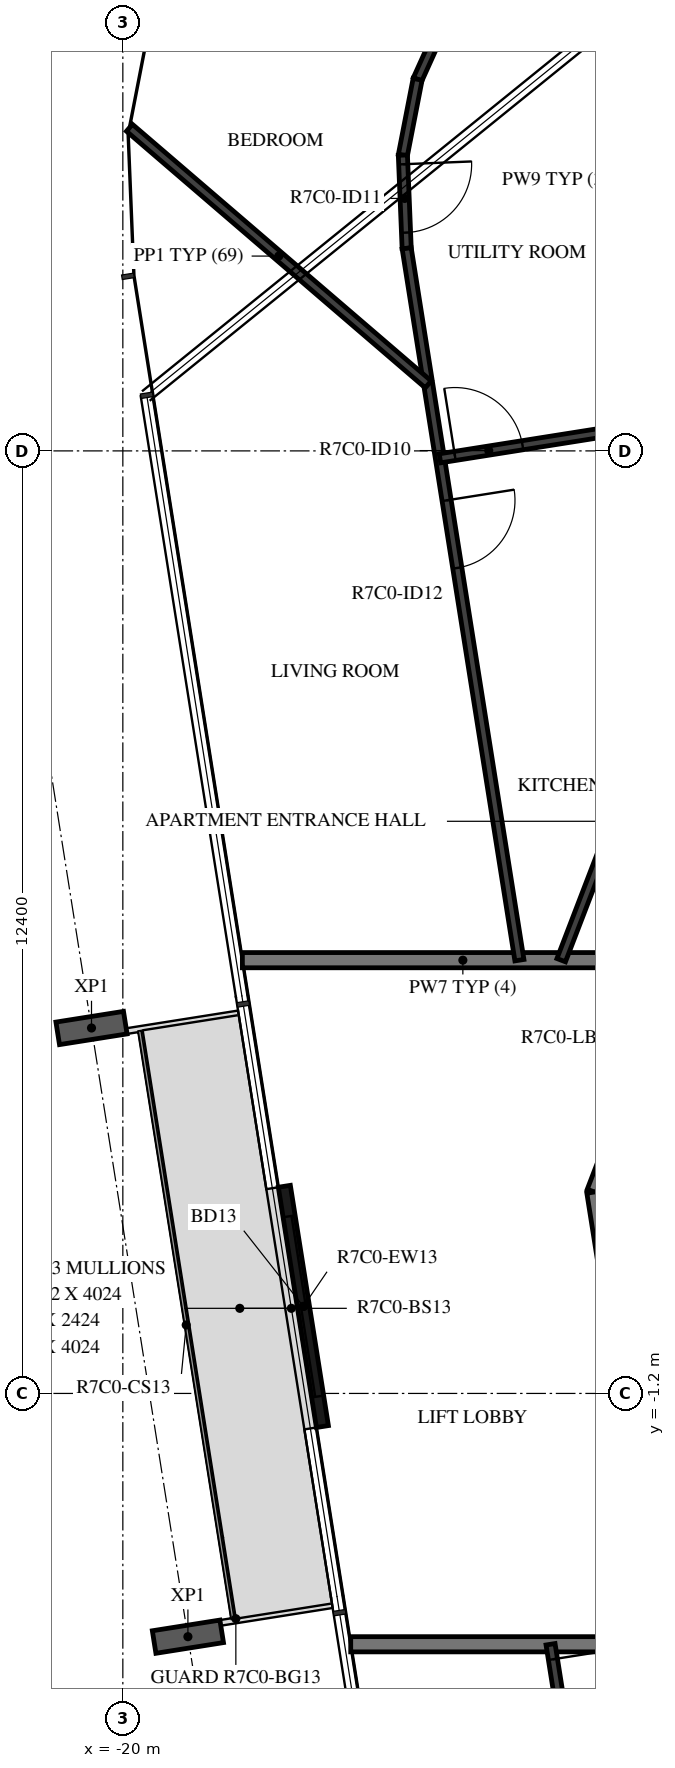
"""IFC4 building model, lengths in metres.
Left out: names, types, materials, properties, quantities, classifications, styles, units other than length and angle.
Written with IfcOpenShell. Run it as: python <this file> out.ifc"""

import sys

from ifc_helpers import new_model, si_unit, direction, frame, frame_2d, origin, origin_2d, place, context, subcontext, project, spatial, rectangle, i_section, extrude, element, fill, save


model = new_model("IFC4")
c1 = context("Model", 3, precision=1e-05, world=origin(), true_north=direction((0.0, 1.0)))
c2 = subcontext(c1, "Body", "Model", "MODEL_VIEW")
j1 = project(units=[si_unit("LENGTHUNIT", "METRE"), si_unit("PLANEANGLEUNIT", "RADIAN")], contexts=[c1])
p1 = place(None, origin())
s1 = spatial("IfcSite", under=j1, at=p1, CompositionType="ELEMENT")
p2 = place(p1, origin())
s2 = spatial("IfcBuilding", under=s1, at=p2, CompositionType="ELEMENT")
p3 = place(p2, frame((0.0, 0.0, 284.4)))
s3 = spatial("IfcBuildingStorey", under=s2, at=p3, CompositionType="ELEMENT", Elevation=284.4)
for number, where, z_axis, x_axis in (
    (1, (-20.412, 3.608, -0.38), (0.0, 0.0, 1.0), (-0.156, 0.988, 0.0)),
    (2, (-19.144, -4.4, -0.38), (0.0, 0.0, 1.0), (-0.156, 0.988, 0.0)),
):
    element("IfcColumn", number, at=place(p3, frame(where, z_axis=z_axis, x_axis=x_axis)), inside=s3, PredefinedType="COLUMN", context=c2, shape_type="SweptSolid", body=[
        extrude(i_section(OverallWidth=0.3, OverallDepth=0.9, WebThickness=0.019, FlangeThickness=0.035, FilletRadius=0.03, at=origin_2d()), origin(), (0.0, 0.0, 1.0), 3.5),
    ])
p4 = place(p3, frame((-17.875, 1.525, 0.0), z_axis=(0.0, 0.0, 1.0), x_axis=(0.156413134305, -0.987691718816, 0.0)))
e3 = element("IfcWall", 3, at=p4, inside=s3, PredefinedType="STANDARD", context=c2, shape_type="SweptSolid", body=[
    extrude(rectangle(XDim=3.2, YDim=0.16, at=frame_2d((1.6, 0.0))), origin(), (0.0, 0.0, 1.0), 3.12),
])
p5 = place(p4, frame((0.4, 0.0, 0.0)))
e4 = element("IfcOpeningElement", 4, at=p5, cuts=e3, PredefinedType="OPENING", context=c2, shape_type="SweptSolid", body=[
    extrude(rectangle(XDim=2.4, YDim=2.4, at=frame_2d((1.2, 1.2))), frame((0.0, 0.09, 0.0), z_axis=(0.0, -1.0, 0.0), x_axis=(1.0, 0.0, 0.0)), (0.0, 0.0, 1.0), 0.18),
])
p6 = place(p3, frame((-11.223, 8.154, 0.0), z_axis=(0.0, 0.0, 1.0), x_axis=(-0.358341090983, -0.93359073609, 0.0)))
e5 = element("IfcWall", 5, at=p6, inside=s3, PredefinedType="STANDARD", context=c2, shape_type="SweptSolid", body=[
    extrude(rectangle(XDim=7.181, YDim=0.2, at=frame_2d((3.59, 0.0))), origin(), (0.0, 0.0, 1.0), 3.12),
])
p7 = place(p6, frame((4.114, 0.0, 0.0)))
e6 = element("IfcOpeningElement", 6, at=p7, cuts=e5, PredefinedType="OPENING", context=c2, shape_type="SweptSolid", body=[
    extrude(rectangle(XDim=1.8, YDim=2.1, at=frame_2d((0.9, 1.05))), frame((0.0, 0.11, 0.0), z_axis=(0.0, -1.0, 0.0), x_axis=(1.0, 0.0, 0.0)), (0.0, 0.0, 1.0), 0.22),
])
p8 = place(p3, frame((-13.797, 1.45, 0.0), z_axis=(0.0, 0.0, 1.0), x_axis=(0.156421704315, -0.987690361611, 0.0)))
e7 = element("IfcWall", 7, at=p8, inside=s3, PredefinedType="STANDARD", context=c2, shape_type="SweptSolid", body=[
    extrude(rectangle(XDim=7.181, YDim=0.2, at=frame_2d((3.591, 0.0))), origin(), (0.0, 0.0, 1.0), 3.12),
])
p9 = place(p3, frame((-12.626, 4.5, 0.0), z_axis=(0.0, 0.0, 1.0), x_axis=(-1.0, 0.0, 0.0)))
e8 = element("IfcWall", 8, at=p9, inside=s3, PredefinedType="STANDARD", context=c2, shape_type="SweptSolid", body=[
    extrude(rectangle(XDim=5.802, YDim=0.2, at=frame_2d((2.901, 0.0))), origin(), (0.0, 0.0, 1.0), 3.12),
])
p10 = place(p3, frame((-17.002, -4.5, 0.0), z_axis=(0.0, 0.0, 1.0), x_axis=(1.0, 0.0, 0.0)))
e9 = element("IfcWall", 9, at=p10, inside=s3, PredefinedType="STANDARD", context=c2, shape_type="SweptSolid", body=[
    extrude(rectangle(XDim=4.148, YDim=0.2, at=frame_2d((2.074, 0.0))), origin(), (0.0, 0.0, 1.0), 3.12),
])
p11 = place(p3, frame((-16.953, 20.936, 0.0), z_axis=(0.0, 0.0, 1.0), x_axis=(0.629331057166, -0.777137324085, 0.0)))
e10 = element("IfcWall", 10, at=p11, inside=s3, PredefinedType="STANDARD", context=c2, shape_type="SweptSolid", body=[
    extrude(rectangle(XDim=6.08, YDim=0.2, at=frame_2d((3.04, 0.0))), origin(), (0.0, 0.0, 1.0), 3.12),
])
p12 = place(p3, frame((-12.479, 9.067, 0.0), z_axis=(0.0, 0.0, 1.0), x_axis=(-0.358387060848, -0.933573090131, 0.0)))
e11 = element("IfcWall", 11, at=p12, inside=s3, PredefinedType="PARTITIONING", context=c2, shape_type="SweptSolid", body=[
    extrude(rectangle(XDim=4.892, YDim=0.12, at=frame_2d((2.446, 0.0))), origin(), (0.0, 0.0, 1.0), 3.12),
])
p13 = place(p3, frame((-15.798, 16.805, 0.0), z_axis=(0.0, 0.0, 1.0), x_axis=(-0.411861127809, -0.911246624904, 0.0)))
e12 = element("IfcWall", 12, at=p13, inside=s3, PredefinedType="PARTITIONING", context=c2, shape_type="SweptSolid", body=[
    extrude(rectangle(XDim=0.787, YDim=0.12, at=frame_2d((0.393, 0.0))), origin(), (0.0, 0.0, 1.0), 3.12),
])
p14 = place(p3, frame((-16.122, 16.088, 0.0), z_axis=(0.0, 0.0, 1.0), x_axis=(-0.191030445301, -0.981584112019, 0.0)))
e13 = element("IfcWall", 13, at=p14, inside=s3, PredefinedType="PARTITIONING", context=c2, shape_type="SweptSolid", body=[
    extrude(rectangle(XDim=1.016, YDim=0.12, at=frame_2d((0.508, 0.0))), origin(), (0.0, 0.0, 1.0), 3.12),
])
p15 = place(p3, frame((-16.316, 15.091, 0.0), z_axis=(0.0, 0.0, 1.0), x_axis=(0.040786423131, -0.999167887639, 0.0)))
e14 = element("IfcWall", 14, at=p15, inside=s3, PredefinedType="PARTITIONING", context=c2, shape_type="SweptSolid", body=[
    extrude(rectangle(XDim=1.227, YDim=0.12, at=frame_2d((0.614, 0.0))), origin(), (0.0, 0.0, 1.0), 3.12),
])
p16 = place(p15, frame((0.12, 0.0, 0.0)))
e15 = element("IfcOpeningElement", 15, at=p16, cuts=e14, PredefinedType="OPENING", context=c2, shape_type="SweptSolid", body=[
    extrude(rectangle(XDim=0.9, YDim=2.1, at=frame_2d((0.45, 1.05))), frame((0.0, 0.07, 0.0), z_axis=(0.0, -1.0, 0.0), x_axis=(1.0, 0.0, 0.0)), (0.0, 0.0, 1.0), 0.14),
])
p17 = place(p3, frame((-16.266, 13.865, 0.0), z_axis=(0.0, 0.0, 1.0), x_axis=(0.156422690833, -0.987690205374, 0.0)))
e16 = element("IfcWall", 16, at=p17, inside=s3, PredefinedType="PARTITIONING", context=c2, shape_type="SweptSolid", body=[
    extrude(rectangle(XDim=9.482, YDim=0.12, at=frame_2d((4.741, 0.0))), origin(), (0.0, 0.0, 1.0), 3.12),
])
p18 = place(p17, frame((3.357, 0.0, 0.0)))
e17 = element("IfcOpeningElement", 17, at=p18, cuts=e16, PredefinedType="OPENING", context=c2, shape_type="SweptSolid", body=[
    extrude(rectangle(XDim=0.9, YDim=2.1, at=frame_2d((0.45, 1.05))), frame((0.0, 0.07, 0.0), z_axis=(0.0, -1.0, 0.0), x_axis=(1.0, 0.0, 0.0)), (0.0, 0.0, 1.0), 0.14),
])
p19 = place(p3, frame((-15.828, 11.102, 0.0), z_axis=(0.0, 0.0, 1.0), x_axis=(0.98768671358, 0.156444737262, 0.0)))
e18 = element("IfcWall", 18, at=p19, inside=s3, PredefinedType="PARTITIONING", context=c2, shape_type="SweptSolid", body=[
    extrude(rectangle(XDim=6.136, YDim=0.12, at=frame_2d((3.068, 0.0))), origin(), (0.0, 0.0, 1.0), 3.12),
])
p20 = place(p19, frame((0.2, 0.0, 0.0)))
e19 = element("IfcOpeningElement", 19, at=p20, cuts=e18, PredefinedType="OPENING", context=c2, shape_type="SweptSolid", body=[
    extrude(rectangle(XDim=0.9, YDim=2.1, at=frame_2d((0.45, 1.05))), frame((0.0, 0.07, 0.0), z_axis=(0.0, -1.0, 0.0), x_axis=(1.0, 0.0, 0.0)), (0.0, 0.0, 1.0), 0.14),
])
p21 = place(p3, frame((-19.913, 15.451, 0.0), z_axis=(0.0, 0.0, 1.0), x_axis=(0.758627615547, -0.651524474544, 0.0)))
e20 = element("IfcWall", 20, at=p21, inside=s3, PredefinedType="PARTITIONING", context=c2, shape_type="SweptSolid", body=[
    extrude(rectangle(XDim=5.181, YDim=0.12, at=frame_2d((2.591, 0.0))), origin(), (0.0, 0.0, 1.0), 3.12),
])
p22 = place(p3, frame((-14.373, -4.5, 0.0), z_axis=(0.0, 0.0, 1.0), x_axis=(0.156437152886, -0.987687914878, 0.0)))
e21 = element("IfcWall", 21, at=p22, inside=s3, PredefinedType="PARTITIONING", context=c2, shape_type="SweptSolid", body=[
    extrude(rectangle(XDim=1.796, YDim=0.12, at=frame_2d((0.898, 0.0))), origin(), (0.0, 0.0, 1.0), 3.12),
])
p23 = place(p22, frame((0.2, 0.0, 0.0)))
e22 = element("IfcOpeningElement", 22, at=p23, cuts=e21, PredefinedType="OPENING", context=c2, shape_type="SweptSolid", body=[
    extrude(rectangle(XDim=0.9, YDim=2.1, at=frame_2d((0.45, 1.05))), frame((0.0, 0.07, 0.0), z_axis=(0.0, -1.0, 0.0), x_axis=(1.0, 0.0, 0.0)), (0.0, 0.0, 1.0), 0.14),
])
p24 = place(p5, origin())
e23 = element("IfcDoor", 23, at=p24, inside=s3, OperationType="DOUBLE_DOOR_SLIDING", PredefinedType="DOOR", context=c2, shape_type="SweptSolid", body=[
    extrude(rectangle(XDim=2.4, YDim=2.4, at=frame_2d((1.2, 1.2))), frame((0.0, 0.025, 0.0), z_axis=(0.0, -1.0, 0.0), x_axis=(1.0, 0.0, 0.0)), (0.0, 0.0, 1.0), 0.05),
])
fill(e4, e23)
p25 = place(p20, origin())
e24 = element("IfcDoor", 24, at=p25, inside=s3, OperationType="SINGLE_SWING_LEFT", PredefinedType="DOOR", context=c2, shape_type="SweptSolid", body=[
    extrude(rectangle(XDim=0.9, YDim=2.1, at=frame_2d((0.45, 1.05))), frame((0.0, 0.025, 0.0), z_axis=(0.0, -1.0, 0.0), x_axis=(1.0, 0.0, 0.0)), (0.0, 0.0, 1.0), 0.05),
])
fill(e19, e24)
p26 = place(p16, origin())
e25 = element("IfcDoor", 25, at=p26, inside=s3, OperationType="SINGLE_SWING_RIGHT", PredefinedType="DOOR", context=c2, shape_type="SweptSolid", body=[
    extrude(rectangle(XDim=0.9, YDim=2.1, at=frame_2d((0.45, 1.05))), frame((0.0, 0.025, 0.0), z_axis=(0.0, -1.0, 0.0), x_axis=(1.0, 0.0, 0.0)), (0.0, 0.0, 1.0), 0.05),
])
fill(e15, e25)
p27 = place(p18, origin())
e26 = element("IfcDoor", 26, at=p27, inside=s3, OperationType="SINGLE_SWING_LEFT", PredefinedType="DOOR", context=c2, shape_type="SweptSolid", body=[
    extrude(rectangle(XDim=0.9, YDim=2.1, at=frame_2d((0.45, 1.05))), frame((0.0, 0.025, 0.0), z_axis=(0.0, -1.0, 0.0), x_axis=(1.0, 0.0, 0.0)), (0.0, 0.0, 1.0), 0.05),
])
fill(e17, e26)
p28 = place(p23, origin())
e27 = element("IfcDoor", 27, at=p28, inside=s3, OperationType="SINGLE_SWING_RIGHT", PredefinedType="DOOR", context=c2, shape_type="SweptSolid", body=[
    extrude(rectangle(XDim=0.9, YDim=2.1, at=frame_2d((0.45, 1.05))), frame((0.0, 0.025, 0.0), z_axis=(0.0, -1.0, 0.0), x_axis=(1.0, 0.0, 0.0)), (0.0, 0.0, 1.0), 0.05),
])
fill(e22, e27)
save(model, sys.argv[1])
